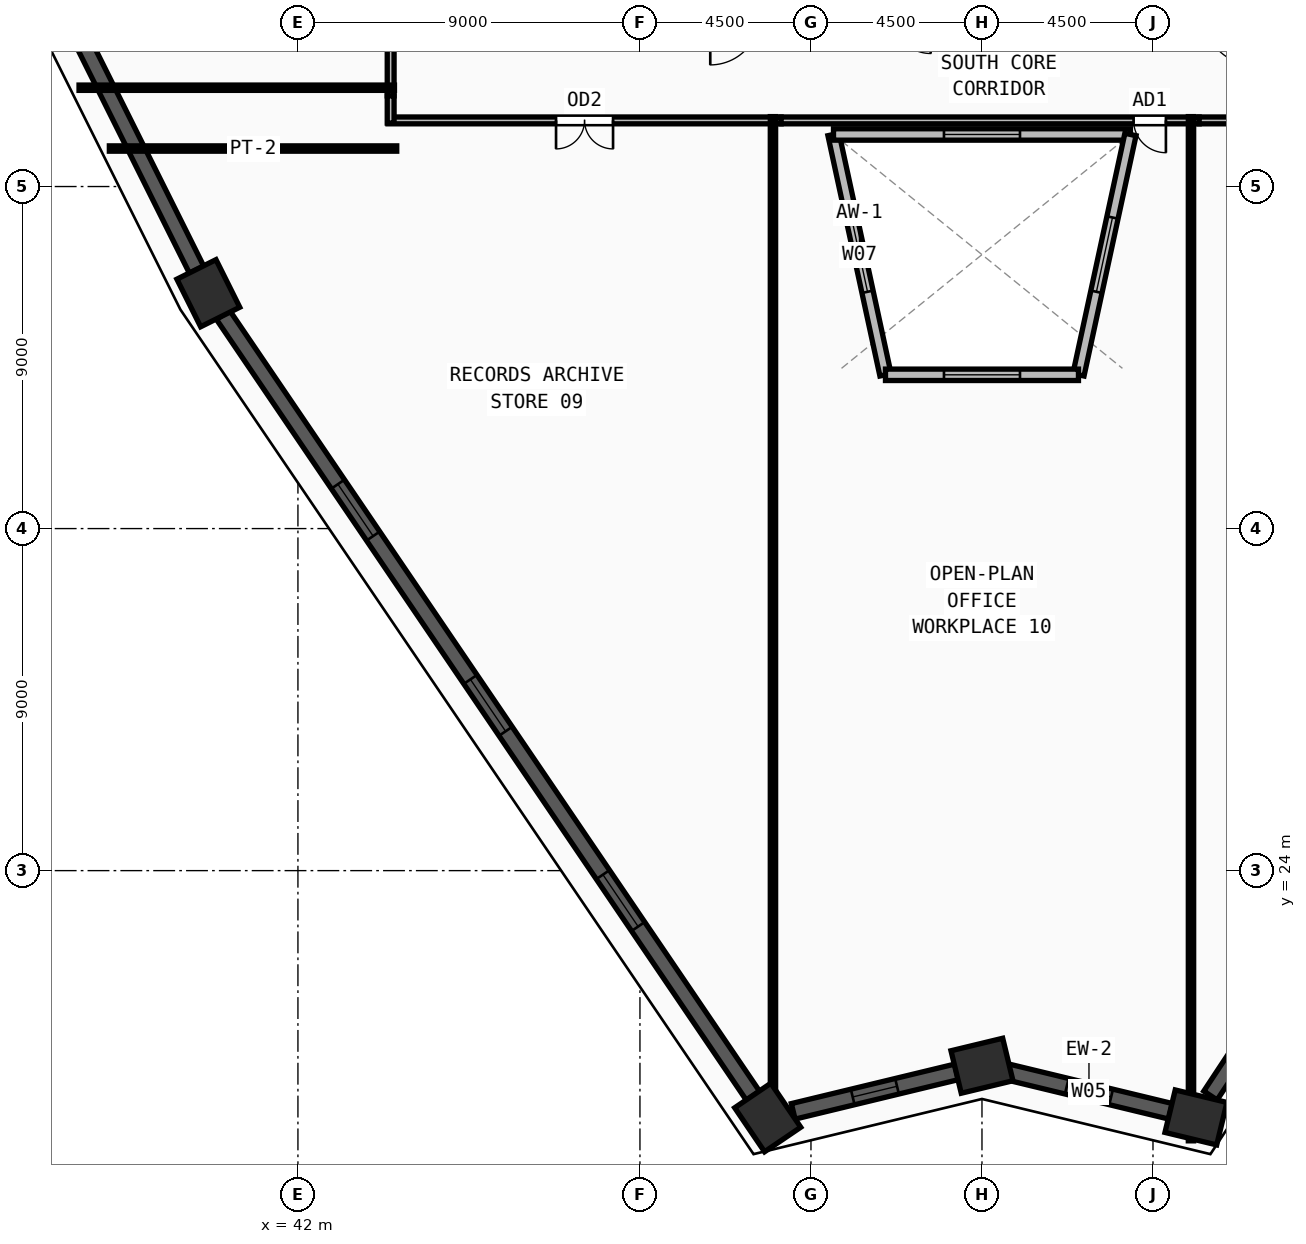
"""IFC4 building model, lengths in metres.
Left out: names, types, materials, properties, quantities, classifications, styles, units other than length and angle.
Written with IfcOpenShell. Run it as: python <this file> out.ifc"""

import sys

from ifc_helpers import new_model, si_unit, direction, frame, frame_2d, origin, origin_2d, place, context, subcontext, project, spatial, rectangle, extrude, source, transform, mapped, element, fill, save


model = new_model("IFC4")
c1 = context("Model", 3, precision=1e-05, world=origin(), true_north=direction((0.0, 1.0)))
c2 = subcontext(c1, "Body", "Model", "MODEL_VIEW")
j1 = project(units=[si_unit("LENGTHUNIT", "METRE"), si_unit("PLANEANGLEUNIT", "RADIAN")], contexts=[c1])
p1 = place(None, origin())
s1 = spatial("IfcSite", under=j1, at=p1, CompositionType="ELEMENT")
p2 = place(p1, origin())
s2 = spatial("IfcBuilding", under=s1, at=p2, CompositionType="ELEMENT")
p3 = place(p2, frame((0.0, 0.0, 177.75)))
s3 = spatial("IfcBuildingStorey", under=s2, at=p3, CompositionType="ELEMENT", Elevation=177.75)
m1 = source(origin(), c2, "Body", "SweptSolid", [
    extrude(rectangle(XDim=1.4, YDim=1.15, at=origin_2d()), origin(), (0.0, 0.0, 1.0), 3.75),
])
for number, where, z_axis, x_axis in (
    (1, (54.362, 17.504, 0.0), (0.0, 0.0, 1.0), (-0.562, 0.827, 0.0)),
    (2, (39.642, 39.193, 0.0), (0.0, 0.0, 1.0), (-0.447, 0.895, 0.0)),
    (3, (65.631, 17.506, 0.0), (0.0, 0.0, 1.0), (-0.972, 0.235, 0.0)),
    (4, (60.0, 18.866, 0.0), (0.0, 0.0, 1.0), (0.972, 0.235, 0.0)),
):
    element("IfcColumn", number, at=place(p3, frame(where, z_axis=z_axis, x_axis=x_axis)), inside=s3, PredefinedType="COLUMN", context=c2, shape_type="MappedRepresentation", body=[
        mapped(m1, transform((0.0, 0.0, 0.0), x_axis=(1.0, 0.0, 0.0), y_axis=(0.0, 1.0, 0.0), z_axis=(0.0, 0.0, 1.0), scale=1.0)),
    ])
p4 = place(p3, frame((60.671, 18.704, 0.0), z_axis=(0.0, 0.0, 1.0), x_axis=(0.972038673822, -0.234820818061, 0.0)))
e5 = element("IfcWall", 5, at=p4, inside=s3, PredefinedType="SOLIDWALL", context=c2, shape_type="SweptSolid", body=[
    extrude(rectangle(XDim=4.412, YDim=0.42, at=frame_2d((2.206, 0.0))), origin(), (0.0, 0.0, 1.0), 3.57),
])
m2 = source(origin(), c2, "Body", "SweptSolid", [
    extrude(rectangle(XDim=1.2, YDim=1.9, at=frame_2d((0.6, 0.95))), frame((0.0, 0.22, 0.0), z_axis=(0.0, -1.0, 0.0), x_axis=(1.0, 0.0, 0.0)), (0.0, 0.0, 1.0), 0.44),
])
p5 = place(p4, frame((1.606, 0.0, 0.55)))
e6 = element("IfcOpeningElement", 6, at=p5, cuts=e5, PredefinedType="OPENING", context=c2, shape_type="MappedRepresentation", body=[
    mapped(m2, transform((0.0, 0.0, 0.0), x_axis=(1.0, 0.0, 0.0), y_axis=(0.0, 1.0, 0.0), z_axis=(0.0, 0.0, 1.0), scale=1.0)),
])
p6 = place(p3, frame((66.012, 18.082, 0.0), z_axis=(0.0, 0.0, 1.0), x_axis=(0.551595967402, 0.834111436647, 0.0)))
e7 = element("IfcWall", 7, at=p6, inside=s3, PredefinedType="SOLIDWALL", context=c2, shape_type="SweptSolid", body=[
    extrude(rectangle(XDim=30.111, YDim=0.42, at=frame_2d((15.056, 0.0))), origin(), (0.0, 0.0, 1.0), 3.57),
])
m3 = source(origin(), c2, "Body", "SweptSolid", [
    extrude(rectangle(XDim=1.65, YDim=1.95, at=frame_2d((0.825, 0.975))), frame((0.0, 0.22, 0.0), z_axis=(0.0, -1.0, 0.0), x_axis=(1.0, 0.0, 0.0)), (0.0, 0.0, 1.0), 0.44),
])
p7 = place(p6, frame((6.703, 0.0, 0.55)))
e8 = element("IfcOpeningElement", 8, at=p7, cuts=e7, PredefinedType="OPENING", context=c2, shape_type="MappedRepresentation", body=[
    mapped(m3, transform((0.0, 0.0, 0.0), x_axis=(1.0, 0.0, 0.0), y_axis=(0.0, 1.0, 0.0), z_axis=(0.0, 0.0, 1.0), scale=1.0)),
])
p8 = place(p6, frame((14.231, 0.0, 0.55)))
e9 = element("IfcOpeningElement", 9, at=p8, cuts=e7, PredefinedType="OPENING", context=c2, shape_type="MappedRepresentation", body=[
    mapped(m3, transform((0.0, 0.0, 0.0), x_axis=(1.0, 0.0, 0.0), y_axis=(0.0, 1.0, 0.0), z_axis=(0.0, 0.0, 1.0), scale=1.0)),
])
p9 = place(p6, frame((21.758, 0.0, 0.55)))
e10 = element("IfcOpeningElement", 10, at=p9, cuts=e7, PredefinedType="OPENING", context=c2, shape_type="MappedRepresentation", body=[
    mapped(m3, transform((0.0, 0.0, 0.0), x_axis=(1.0, 0.0, 0.0), y_axis=(0.0, 1.0, 0.0), z_axis=(0.0, 0.0, 1.0), scale=1.0)),
])
p10 = place(p3, frame((25.888, 66.753, 0.0), z_axis=(0.0, 0.0, 1.0), x_axis=(0.446538896614, -0.894764222469, 0.0)))
e11 = element("IfcWall", 11, at=p10, inside=s3, PredefinedType="SOLIDWALL", context=c2, shape_type="SweptSolid", body=[
    extrude(rectangle(XDim=30.112, YDim=0.42, at=frame_2d((15.056, 0.0))), origin(), (0.0, 0.0, 1.0), 3.57),
])
p11 = place(p10, frame((6.703, 0.0, 0.55)))
e12 = element("IfcOpeningElement", 12, at=p11, cuts=e11, PredefinedType="OPENING", context=c2, shape_type="MappedRepresentation", body=[
    mapped(m3, transform((0.0, 0.0, 0.0), x_axis=(1.0, 0.0, 0.0), y_axis=(0.0, 1.0, 0.0), z_axis=(0.0, 0.0, 1.0), scale=1.0)),
])
p12 = place(p10, frame((15.781, 0.0, 0.55)))
e13 = element("IfcOpeningElement", 13, at=p12, cuts=e11, PredefinedType="OPENING", context=c2, shape_type="MappedRepresentation", body=[
    mapped(m3, transform((0.0, 0.0, 0.0), x_axis=(1.0, 0.0, 0.0), y_axis=(0.0, 1.0, 0.0), z_axis=(0.0, 0.0, 1.0), scale=1.0)),
])
p13 = place(p10, frame((21.759, 0.0, 0.55)))
e14 = element("IfcOpeningElement", 14, at=p13, cuts=e11, PredefinedType="OPENING", context=c2, shape_type="MappedRepresentation", body=[
    mapped(m3, transform((0.0, 0.0, 0.0), x_axis=(1.0, 0.0, 0.0), y_axis=(0.0, 1.0, 0.0), z_axis=(0.0, 0.0, 1.0), scale=1.0)),
])
p14 = place(p3, frame((40.029, 38.622, 0.0), z_axis=(0.0, 0.0, 1.0), x_axis=(0.561593975114, -0.827412960447, 0.0)))
e15 = element("IfcWall", 15, at=p14, inside=s3, PredefinedType="SOLIDWALL", context=c2, shape_type="SweptSolid", body=[
    extrude(rectangle(XDim=24.833, YDim=0.42, at=frame_2d((12.417, 0.0))), origin(), (0.0, 0.0, 1.0), 3.57),
])
p15 = place(p14, frame((5.383, 0.0, 0.55)))
e16 = element("IfcOpeningElement", 16, at=p15, cuts=e15, PredefinedType="OPENING", context=c2, shape_type="MappedRepresentation", body=[
    mapped(m3, transform((0.0, 0.0, 0.0), x_axis=(1.0, 0.0, 0.0), y_axis=(0.0, 1.0, 0.0), z_axis=(0.0, 0.0, 1.0), scale=1.0)),
])
p16 = place(p14, frame((11.591, 0.0, 0.55)))
e17 = element("IfcOpeningElement", 17, at=p16, cuts=e15, PredefinedType="OPENING", context=c2, shape_type="MappedRepresentation", body=[
    mapped(m3, transform((0.0, 0.0, 0.0), x_axis=(1.0, 0.0, 0.0), y_axis=(0.0, 1.0, 0.0), z_axis=(0.0, 0.0, 1.0), scale=1.0)),
])
p17 = place(p14, frame((17.8, 0.0, 0.55)))
e18 = element("IfcOpeningElement", 18, at=p17, cuts=e15, PredefinedType="OPENING", context=c2, shape_type="MappedRepresentation", body=[
    mapped(m3, transform((0.0, 0.0, 0.0), x_axis=(1.0, 0.0, 0.0), y_axis=(0.0, 1.0, 0.0), z_axis=(0.0, 0.0, 1.0), scale=1.0)),
])
p18 = place(p3, frame((55.033, 17.666, 0.0), z_axis=(0.0, 0.0, 1.0), x_axis=(0.972026135821, 0.234872712935, 0.0)))
e19 = element("IfcWall", 19, at=p18, inside=s3, PredefinedType="SOLIDWALL", context=c2, shape_type="SweptSolid", body=[
    extrude(rectangle(XDim=4.42, YDim=0.42, at=frame_2d((2.21, 0.0))), origin(), (0.0, 0.0, 1.0), 3.57),
])
p19 = place(p18, frame((1.61, 0.0, 0.55)))
e20 = element("IfcOpeningElement", 20, at=p19, cuts=e19, PredefinedType="OPENING", context=c2, shape_type="MappedRepresentation", body=[
    mapped(m2, transform((0.0, 0.0, 0.0), x_axis=(1.0, 0.0, 0.0), y_axis=(0.0, 1.0, 0.0), z_axis=(0.0, 0.0, 1.0), scale=1.0)),
])
p20 = place(p3, frame((57.461, 37.046, 0.0), z_axis=(0.0, 0.0, 1.0), x_axis=(-0.211409755765, 0.977397521568, 0.0)))
e21 = element("IfcWall", 21, at=p20, inside=s3, PredefinedType="SOLIDWALL", context=c2, shape_type="SweptSolid", body=[
    extrude(rectangle(XDim=6.47, YDim=0.3, at=frame_2d((3.235, 0.0))), origin(), (0.0, 0.0, 1.0), 3.57),
])
m4 = source(origin(), c2, "Body", "SweptSolid", [
    extrude(rectangle(XDim=2.0, YDim=1.9, at=frame_2d((1.0, 0.95))), frame((0.0, 0.16, 0.0), z_axis=(0.0, -1.0, 0.0), x_axis=(1.0, 0.0, 0.0)), (0.0, 0.0, 1.0), 0.32),
])
p21 = place(p20, frame((2.235, 0.0, 0.55)))
e22 = element("IfcOpeningElement", 22, at=p21, cuts=e21, PredefinedType="OPENING", context=c2, shape_type="MappedRepresentation", body=[
    mapped(m4, transform((0.0, 0.0, 0.0), x_axis=(1.0, 0.0, 0.0), y_axis=(0.0, 1.0, 0.0), z_axis=(0.0, 0.0, 1.0), scale=1.0)),
])
p22 = place(p3, frame((56.093, 43.37, 0.0), z_axis=(0.0, 0.0, 1.0), x_axis=(1.0, 0.0, 0.0)))
e23 = element("IfcWall", 23, at=p22, inside=s3, PredefinedType="SOLIDWALL", context=c2, shape_type="SweptSolid", body=[
    extrude(rectangle(XDim=7.814, YDim=0.3, at=frame_2d((3.907, 0.0))), origin(), (0.0, 0.0, 1.0), 3.57),
])
p23 = place(p22, frame((2.907, 0.0, 0.55)))
e24 = element("IfcOpeningElement", 24, at=p23, cuts=e23, PredefinedType="OPENING", context=c2, shape_type="MappedRepresentation", body=[
    mapped(m4, transform((0.0, 0.0, 0.0), x_axis=(1.0, 0.0, 0.0), y_axis=(0.0, 1.0, 0.0), z_axis=(0.0, 0.0, 1.0), scale=1.0)),
])
p24 = place(p3, frame((63.907, 43.37, 0.0), z_axis=(0.0, 0.0, 1.0), x_axis=(-0.211409755765, -0.977397521568, 0.0)))
e25 = element("IfcWall", 25, at=p24, inside=s3, PredefinedType="SOLIDWALL", context=c2, shape_type="SweptSolid", body=[
    extrude(rectangle(XDim=6.47, YDim=0.3, at=frame_2d((3.235, 0.0))), origin(), (0.0, 0.0, 1.0), 3.57),
])
p25 = place(p24, frame((2.235, 0.0, 0.55)))
e26 = element("IfcOpeningElement", 26, at=p25, cuts=e25, PredefinedType="OPENING", context=c2, shape_type="MappedRepresentation", body=[
    mapped(m4, transform((0.0, 0.0, 0.0), x_axis=(1.0, 0.0, 0.0), y_axis=(0.0, 1.0, 0.0), z_axis=(0.0, 0.0, 1.0), scale=1.0)),
])
p26 = place(p3, frame((62.539, 37.046, 0.0), z_axis=(0.0, 0.0, 1.0), x_axis=(-1.0, 0.0, 0.0)))
e27 = element("IfcWall", 27, at=p26, inside=s3, PredefinedType="SOLIDWALL", context=c2, shape_type="SweptSolid", body=[
    extrude(rectangle(XDim=5.078, YDim=0.3, at=frame_2d((2.539, 0.0))), origin(), (0.0, 0.0, 1.0), 3.57),
])
p27 = place(p26, frame((1.539, 0.0, 0.55)))
e28 = element("IfcOpeningElement", 28, at=p27, cuts=e27, PredefinedType="OPENING", context=c2, shape_type="MappedRepresentation", body=[
    mapped(m4, transform((0.0, 0.0, 0.0), x_axis=(1.0, 0.0, 0.0), y_axis=(0.0, 1.0, 0.0), z_axis=(0.0, 0.0, 1.0), scale=1.0)),
])
p28 = place(p3, frame((44.44, 44.385, 0.0), z_axis=(0.0, 0.0, 1.0), x_axis=(0.0, 1.0, 0.0)))
e29 = element("IfcWall", 29, at=p28, inside=s3, PredefinedType="PARTITIONING", context=c2, shape_type="SweptSolid", body=[
    extrude(rectangle(XDim=5.33, YDim=0.18, at=frame_2d((2.665, 0.0))), origin(), (0.0, 0.0, 1.0), 3.57),
])
m5 = source(origin(), c2, "Body", "SweptSolid", [
    extrude(rectangle(XDim=1.0, YDim=2.2, at=frame_2d((0.5, 1.1))), frame((0.0, 0.1, 0.0), z_axis=(0.0, -1.0, 0.0), x_axis=(1.0, 0.0, 0.0)), (0.0, 0.0, 1.0), 0.2),
])
p29 = place(p28, frame((2.165, 0.0, 0.0)))
e30 = element("IfcOpeningElement", 30, at=p29, cuts=e29, PredefinedType="OPENING", context=c2, shape_type="MappedRepresentation", body=[
    mapped(m5, transform((0.0, 0.0, 0.0), x_axis=(1.0, 0.0, 0.0), y_axis=(0.0, 1.0, 0.0), z_axis=(0.0, 0.0, 1.0), scale=1.0)),
])
p30 = place(p3, frame((54.715, 43.74, 0.0), z_axis=(0.0, 0.0, 1.0), x_axis=(-1.0, 0.0, 0.0)))
e31 = element("IfcWall", 31, at=p30, inside=s3, PredefinedType="PARTITIONING", context=c2, shape_type="SweptSolid", body=[
    extrude(rectangle(XDim=10.345, YDim=0.18, at=frame_2d((5.172, 0.0))), origin(), (0.0, 0.0, 1.0), 3.57),
])
m6 = source(origin(), c2, "Body", "SweptSolid", [
    extrude(rectangle(XDim=1.5, YDim=2.2, at=frame_2d((0.75, 1.1))), frame((0.0, 0.1, 0.0), z_axis=(0.0, -1.0, 0.0), x_axis=(1.0, 0.0, 0.0)), (0.0, 0.0, 1.0), 0.2),
])
p31 = place(p30, frame((4.423, 0.0, 0.0)))
e32 = element("IfcOpeningElement", 32, at=p31, cuts=e31, PredefinedType="OPENING", context=c2, shape_type="MappedRepresentation", body=[
    mapped(m6, transform((0.0, 0.0, 0.0), x_axis=(1.0, 0.0, 0.0), y_axis=(0.0, 1.0, 0.0), z_axis=(0.0, 0.0, 1.0), scale=1.0)),
])
p32 = place(p3, frame((65.715, 43.74, 0.0), z_axis=(0.0, 0.0, 1.0), x_axis=(-1.0, 0.0, 0.0)))
e33 = element("IfcWall", 33, at=p32, inside=s3, PredefinedType="PARTITIONING", context=c2, shape_type="SweptSolid", body=[
    extrude(rectangle(XDim=11.0, YDim=0.18, at=frame_2d((5.5, 0.0))), origin(), (0.0, 0.0, 1.0), 3.57),
])
m7 = source(origin(), c2, "Body", "SweptSolid", [
    extrude(rectangle(XDim=0.85, YDim=2.1, at=frame_2d((0.425, 1.05))), frame((0.0, 0.1, 0.0), z_axis=(0.0, -1.0, 0.0), x_axis=(1.0, 0.0, 0.0)), (0.0, 0.0, 1.0), 0.2),
])
p33 = place(p32, frame((0.875, 0.0, 0.0)))
e34 = element("IfcOpeningElement", 34, at=p33, cuts=e33, PredefinedType="OPENING", context=c2, shape_type="MappedRepresentation", body=[
    mapped(m7, transform((0.0, 0.0, 0.0), x_axis=(1.0, 0.0, 0.0), y_axis=(0.0, 1.0, 0.0), z_axis=(0.0, 0.0, 1.0), scale=1.0)),
])
p34 = place(p3, frame((75.63, 43.74, 0.0), z_axis=(0.0, 0.0, 1.0), x_axis=(-1.0, 0.0, 0.0)))
e35 = element("IfcWall", 35, at=p34, inside=s3, PredefinedType="PARTITIONING", context=c2, shape_type="SweptSolid", body=[
    extrude(rectangle(XDim=9.915, YDim=0.18, at=frame_2d((4.958, 0.0))), origin(), (0.0, 0.0, 1.0), 3.57),
])
p35 = place(p34, frame((4.207, 0.0, 0.0)))
e36 = element("IfcOpeningElement", 36, at=p35, cuts=e35, PredefinedType="OPENING", context=c2, shape_type="MappedRepresentation", body=[
    mapped(m6, transform((0.0, 0.0, 0.0), x_axis=(1.0, 0.0, 0.0), y_axis=(0.0, 1.0, 0.0), z_axis=(0.0, 0.0, 1.0), scale=1.0)),
])
p36 = place(p3, frame((44.44, 43.67, 0.0), z_axis=(0.0, 0.0, 1.0), x_axis=(0.0, 1.0, 0.0)))
e37 = element("IfcWall", 37, at=p36, inside=s3, PredefinedType="PARTITIONING", context=c2, shape_type="SweptSolid", body=[
    extrude(rectangle(XDim=0.715, YDim=0.18, at=frame_2d((0.357, 0.0))), origin(), (0.0, 0.0, 1.0), 3.57),
])
p37 = place(p3, frame((44.6, 43.0, 0.0), z_axis=(0.0, 0.0, 1.0), x_axis=(-1.0, 0.0, 0.0)))
e38 = element("IfcWall", 38, at=p37, inside=s3, PredefinedType="PARTITIONING", context=c2, shape_type="SweptSolid", body=[
    extrude(rectangle(XDim=7.562, YDim=0.14, at=frame_2d((3.781, 0.0))), origin(), (0.0, 0.0, 1.0), 3.57),
])
p38 = place(p3, frame((44.54, 44.6, 0.0), z_axis=(0.0, 0.0, 1.0), x_axis=(-1.0, 0.0, 0.0)))
e39 = element("IfcWall", 39, at=p38, inside=s3, PredefinedType="PARTITIONING", context=c2, shape_type="SweptSolid", body=[
    extrude(rectangle(XDim=8.3, YDim=0.14, at=frame_2d((4.15, 0.0))), origin(), (0.0, 0.0, 1.0), 3.57),
])
for number, where, z_axis, x_axis in (
    (40, (54.5, 43.84, 0.0), (0.0, 0.0, 1.0), (0.0, -1.0, 0.0)),
    (41, (65.5, 43.84, 0.0), (0.0, 0.0, 1.0), (0.0, -1.0, 0.0)),
):
    element("IfcWall", number, at=place(p3, frame(where, z_axis=z_axis, x_axis=x_axis)), inside=s3, PredefinedType="PARTITIONING", context=c2, shape_type="SweptSolid", body=[
        extrude(rectangle(XDim=26.95, YDim=0.14, at=frame_2d((13.475, 0.0))), origin(), (0.0, 0.0, 1.0), 2.755),
    ])
m8 = source(origin(), c2, "Body", "SweptSolid", [
    extrude(rectangle(XDim=1.2, YDim=1.9, at=frame_2d((0.6, 0.95))), frame((0.0, 0.03, 0.0), z_axis=(0.0, -1.0, 0.0), x_axis=(1.0, 0.0, 0.0)), (0.0, 0.0, 1.0), 0.06),
])
p39 = place(p5, origin())
e42 = element("IfcWindow", 42, at=p39, inside=s3, PartitioningType="SINGLE_PANEL", PredefinedType="WINDOW", context=c2, shape_type="MappedRepresentation", body=[
    mapped(m8, transform((0.0, 0.0, 0.0), x_axis=(1.0, 0.0, 0.0), y_axis=(0.0, 1.0, 0.0), z_axis=(0.0, 0.0, 1.0), scale=1.0)),
])
fill(e6, e42)
m9 = source(origin(), c2, "Body", "SweptSolid", [
    extrude(rectangle(XDim=1.65, YDim=1.95, at=frame_2d((0.825, 0.975))), frame((0.0, 0.03, 0.0), z_axis=(0.0, -1.0, 0.0), x_axis=(1.0, 0.0, 0.0)), (0.0, 0.0, 1.0), 0.06),
])
p40 = place(p15, origin())
e43 = element("IfcWindow", 43, at=p40, inside=s3, PartitioningType="DOUBLE_PANEL_VERTICAL", PredefinedType="WINDOW", context=c2, shape_type="MappedRepresentation", body=[
    mapped(m9, transform((0.0, 0.0, 0.0), x_axis=(1.0, 0.0, 0.0), y_axis=(0.0, 1.0, 0.0), z_axis=(0.0, 0.0, 1.0), scale=1.0)),
])
fill(e16, e43)
p41 = place(p16, origin())
e44 = element("IfcWindow", 44, at=p41, inside=s3, PartitioningType="DOUBLE_PANEL_VERTICAL", PredefinedType="WINDOW", context=c2, shape_type="MappedRepresentation", body=[
    mapped(m9, transform((0.0, 0.0, 0.0), x_axis=(1.0, 0.0, 0.0), y_axis=(0.0, 1.0, 0.0), z_axis=(0.0, 0.0, 1.0), scale=1.0)),
])
fill(e17, e44)
p42 = place(p17, origin())
e45 = element("IfcWindow", 45, at=p42, inside=s3, PartitioningType="DOUBLE_PANEL_VERTICAL", PredefinedType="WINDOW", context=c2, shape_type="MappedRepresentation", body=[
    mapped(m9, transform((0.0, 0.0, 0.0), x_axis=(1.0, 0.0, 0.0), y_axis=(0.0, 1.0, 0.0), z_axis=(0.0, 0.0, 1.0), scale=1.0)),
])
fill(e18, e45)
p43 = place(p19, origin())
e46 = element("IfcWindow", 46, at=p43, inside=s3, PartitioningType="SINGLE_PANEL", PredefinedType="WINDOW", context=c2, shape_type="MappedRepresentation", body=[
    mapped(m8, transform((0.0, 0.0, 0.0), x_axis=(1.0, 0.0, 0.0), y_axis=(0.0, 1.0, 0.0), z_axis=(0.0, 0.0, 1.0), scale=1.0)),
])
fill(e20, e46)
m10 = source(origin(), c2, "Body", "SweptSolid", [
    extrude(rectangle(XDim=2.0, YDim=1.9, at=frame_2d((1.0, 0.95))), frame((0.0, 0.03, 0.0), z_axis=(0.0, -1.0, 0.0), x_axis=(1.0, 0.0, 0.0)), (0.0, 0.0, 1.0), 0.06),
])
p44 = place(p21, origin())
e47 = element("IfcWindow", 47, at=p44, inside=s3, PartitioningType="DOUBLE_PANEL_VERTICAL", PredefinedType="WINDOW", context=c2, shape_type="MappedRepresentation", body=[
    mapped(m10, transform((0.0, 0.0, 0.0), x_axis=(1.0, 0.0, 0.0), y_axis=(0.0, 1.0, 0.0), z_axis=(0.0, 0.0, 1.0), scale=1.0)),
])
fill(e22, e47)
p45 = place(p23, origin())
e48 = element("IfcWindow", 48, at=p45, inside=s3, PartitioningType="DOUBLE_PANEL_VERTICAL", PredefinedType="WINDOW", context=c2, shape_type="MappedRepresentation", body=[
    mapped(m10, transform((0.0, 0.0, 0.0), x_axis=(1.0, 0.0, 0.0), y_axis=(0.0, 1.0, 0.0), z_axis=(0.0, 0.0, 1.0), scale=1.0)),
])
fill(e24, e48)
p46 = place(p25, origin())
e49 = element("IfcWindow", 49, at=p46, inside=s3, PartitioningType="DOUBLE_PANEL_VERTICAL", PredefinedType="WINDOW", context=c2, shape_type="MappedRepresentation", body=[
    mapped(m10, transform((0.0, 0.0, 0.0), x_axis=(1.0, 0.0, 0.0), y_axis=(0.0, 1.0, 0.0), z_axis=(0.0, 0.0, 1.0), scale=1.0)),
])
fill(e26, e49)
p47 = place(p27, origin())
e50 = element("IfcWindow", 50, at=p47, inside=s3, PartitioningType="DOUBLE_PANEL_VERTICAL", PredefinedType="WINDOW", context=c2, shape_type="MappedRepresentation", body=[
    mapped(m10, transform((0.0, 0.0, 0.0), x_axis=(1.0, 0.0, 0.0), y_axis=(0.0, 1.0, 0.0), z_axis=(0.0, 0.0, 1.0), scale=1.0)),
])
fill(e28, e50)
m11 = source(origin(), c2, "Body", "SweptSolid", [
    extrude(rectangle(XDim=1.5, YDim=2.2, at=frame_2d((0.75, 1.1))), frame((0.0, 0.025, 0.0), z_axis=(0.0, -1.0, 0.0), x_axis=(1.0, 0.0, 0.0)), (0.0, 0.0, 1.0), 0.05),
])
p48 = place(p31, origin())
e51 = element("IfcDoor", 51, at=p48, inside=s3, OperationType="DOUBLE_DOOR_SINGLE_SWING", PredefinedType="DOOR", context=c2, shape_type="MappedRepresentation", body=[
    mapped(m11, transform((0.0, 0.0, 0.0), x_axis=(1.0, 0.0, 0.0), y_axis=(0.0, 1.0, 0.0), z_axis=(0.0, 0.0, 1.0), scale=1.0)),
])
fill(e32, e51)
m12 = source(origin(), c2, "Body", "SweptSolid", [
    extrude(rectangle(XDim=0.85, YDim=2.1, at=frame_2d((0.425, 1.05))), frame((0.0, 0.025, 0.0), z_axis=(0.0, -1.0, 0.0), x_axis=(1.0, 0.0, 0.0)), (0.0, 0.0, 1.0), 0.05),
])
p49 = place(p33, origin())
e52 = element("IfcDoor", 52, at=p49, inside=s3, OperationType="SINGLE_SWING_LEFT", PredefinedType="DOOR", context=c2, shape_type="MappedRepresentation", body=[
    mapped(m12, transform((0.0, 0.0, 0.0), x_axis=(1.0, 0.0, 0.0), y_axis=(0.0, 1.0, 0.0), z_axis=(0.0, 0.0, 1.0), scale=1.0)),
])
fill(e34, e52)
save(model, sys.argv[1])
